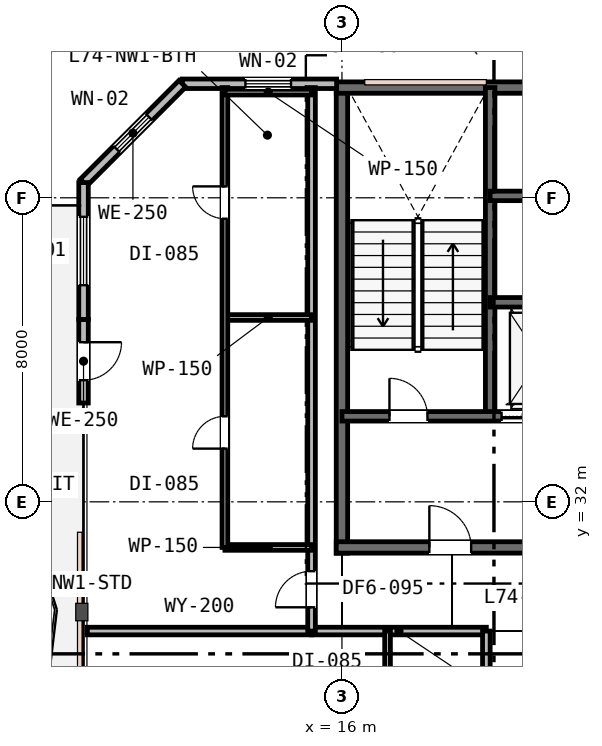
"""IFC4 building model, lengths in metres.
Left out: names, types, materials, properties, quantities, classifications, styles, units other than length and angle.
Written with IfcOpenShell. Run it as: python <this file> out.ifc"""

import sys

from ifc_helpers import new_model, si_unit, direction, frame, frame_2d, origin, place, context, subcontext, project, spatial, rectangle, extrude, element, fill, save


model = new_model("IFC4")
c1 = context("Model", 3, precision=1e-05, world=origin(), true_north=direction((0.0, 1.0)))
c2 = subcontext(c1, "Body", "Model", "MODEL_VIEW")
j1 = project(units=[si_unit("LENGTHUNIT", "METRE"), si_unit("PLANEANGLEUNIT", "RADIAN")], contexts=[c1])
p1 = place(None, origin())
s1 = spatial("IfcSite", under=j1, at=p1, CompositionType="ELEMENT")
p2 = place(p1, origin())
s2 = spatial("IfcBuilding", under=s1, at=p2, CompositionType="ELEMENT")
p3 = place(p2, frame((0.0, 0.0, 286.8)))
s3 = spatial("IfcBuildingStorey", under=s2, at=p3, CompositionType="ELEMENT", Elevation=286.8)
p4 = place(p3, frame((16.0, 30.65, 0.0), z_axis=(0.0, 0.0, 1.0), x_axis=(0.0, 1.0, 0.0)))
e1 = element("IfcWall", 1, at=p4, inside=s3, PredefinedType="SHEAR", context=c2, shape_type="SweptSolid", body=[
    extrude(rectangle(XDim=12.3, YDim=0.3, at=frame_2d((6.15, 0.0))), origin(), (0.0, 0.0, 1.0), 3.8),
])
p5 = place(p3, frame((15.85, 42.9, 0.0), z_axis=(0.0, 0.0, 1.0), x_axis=(1.0, 0.0, 0.0)))
e2 = element("IfcWall", 2, at=p5, inside=s3, PredefinedType="SHEAR", context=c2, shape_type="SweptSolid", body=[
    extrude(rectangle(XDim=24.3, YDim=0.3, at=frame_2d((12.15, 0.0))), origin(), (0.0, 0.0, 1.0), 3.8),
])
p6 = place(p3, frame((15.85, 30.8, 0.0), z_axis=(0.0, 0.0, 1.0), x_axis=(1.0, 0.0, 0.0)))
e3 = element("IfcWall", 3, at=p6, inside=s3, PredefinedType="SHEAR", context=c2, shape_type="SweptSolid", body=[
    extrude(rectangle(XDim=11.2, YDim=0.3, at=frame_2d((5.6, 0.0))), origin(), (0.0, 0.0, 1.0), 3.8),
])
p7 = place(p6, frame((2.45, 0.0, 0.0)))
e4 = element("IfcOpeningElement", 4, at=p7, cuts=e3, PredefinedType="OPENING", context=c2, shape_type="SweptSolid", body=[
    extrude(rectangle(XDim=1.1, YDim=2.15, at=frame_2d((0.55, 1.075))), frame((0.0, 0.16, 0.0), z_axis=(0.0, -1.0, 0.0), x_axis=(1.0, 0.0, 0.0)), (0.0, 0.0, 1.0), 0.32),
])
p8 = place(p3, frame((19.9, 34.25, 0.0), z_axis=(0.0, 0.0, 1.0), x_axis=(0.0, 1.0, 0.0)))
e5 = element("IfcWall", 5, at=p8, inside=s3, PredefinedType="SHEAR", context=c2, shape_type="SweptSolid", body=[
    extrude(rectangle(XDim=8.65, YDim=0.25, at=frame_2d((4.325, 0.0))), origin(), (0.0, 0.0, 1.0), 3.8),
])
p9 = place(p3, frame((16.0, 34.25, 0.0), z_axis=(0.0, 0.0, 1.0), x_axis=(1.0, 0.0, 0.0)))
e6 = element("IfcWall", 6, at=p9, inside=s3, PredefinedType="SHEAR", context=c2, shape_type="SweptSolid", body=[
    extrude(rectangle(XDim=6.05, YDim=0.25, at=frame_2d((3.025, 0.0))), origin(), (0.0, 0.0, 1.0), 3.8),
])
p10 = place(p9, frame((1.25, 0.0, 0.0)))
e7 = element("IfcOpeningElement", 7, at=p10, cuts=e6, PredefinedType="OPENING", context=c2, shape_type="SweptSolid", body=[
    extrude(rectangle(XDim=1.0, YDim=2.15, at=frame_2d((0.5, 1.075))), frame((0.0, 0.135, 0.0), z_axis=(0.0, -1.0, 0.0), x_axis=(1.0, 0.0, 0.0)), (0.0, 0.0, 1.0), 0.27),
])
p11 = place(p9, frame((4.2, 0.0, 0.0)))
e8 = element("IfcOpeningElement", 8, at=p11, cuts=e6, PredefinedType="OPENING", context=c2, shape_type="SweptSolid", body=[
    extrude(rectangle(XDim=1.1, YDim=2.15, at=frame_2d((0.55, 1.075))), frame((0.0, 0.135, 0.0), z_axis=(0.0, -1.0, 0.0), x_axis=(1.0, 0.0, 0.0)), (0.0, 0.0, 1.0), 0.27),
])
p12 = place(p3, frame((19.9, 37.25, 0.0), z_axis=(0.0, 0.0, 1.0), x_axis=(1.0, 0.0, 0.0)))
e9 = element("IfcWall", 9, at=p12, inside=s3, PredefinedType="SHEAR", context=c2, shape_type="SweptSolid", body=[
    extrude(rectangle(XDim=16.2, YDim=0.25, at=frame_2d((8.1, 0.0))), origin(), (0.0, 0.0, 1.0), 3.8),
])
p13 = place(p12, frame((12.55, 0.0, 0.0)))
e10 = element("IfcOpeningElement", 10, at=p13, cuts=e9, PredefinedType="OPENING", context=c2, shape_type="SweptSolid", body=[
    extrude(rectangle(XDim=0.9, YDim=2.15, at=frame_2d((0.45, 1.075))), frame((0.0, 0.135, 0.0), z_axis=(0.0, -1.0, 0.0), x_axis=(1.0, 0.0, 0.0)), (0.0, 0.0, 1.0), 0.27),
])
p14 = place(p12, frame((2.5, 0.0, 0.0)))
e11 = element("IfcOpeningElement", 11, at=p14, cuts=e9, PredefinedType="OPENING", context=c2, shape_type="SweptSolid", body=[
    extrude(rectangle(XDim=1.05, YDim=2.15, at=frame_2d((0.525, 1.075))), frame((0.0, 0.135, 0.0), z_axis=(0.0, -1.0, 0.0), x_axis=(1.0, 0.0, 0.0)), (0.0, 0.0, 1.0), 0.27),
])
p15 = place(p12, frame((4.4, 0.0, 0.0)))
e12 = element("IfcOpeningElement", 12, at=p15, cuts=e9, PredefinedType="OPENING", context=c2, shape_type="SweptSolid", body=[
    extrude(rectangle(XDim=1.05, YDim=2.15, at=frame_2d((0.525, 1.075))), frame((0.0, 0.135, 0.0), z_axis=(0.0, -1.0, 0.0), x_axis=(1.0, 0.0, 0.0)), (0.0, 0.0, 1.0), 0.27),
])
p16 = place(p12, frame((6.3, 0.0, 0.0)))
e13 = element("IfcOpeningElement", 13, at=p16, cuts=e9, PredefinedType="OPENING", context=c2, shape_type="SweptSolid", body=[
    extrude(rectangle(XDim=1.05, YDim=2.15, at=frame_2d((0.525, 1.075))), frame((0.0, 0.135, 0.0), z_axis=(0.0, -1.0, 0.0), x_axis=(1.0, 0.0, 0.0)), (0.0, 0.0, 1.0), 0.27),
])
p17 = place(p3, frame((19.9, 40.05, 0.0), z_axis=(0.0, 0.0, 1.0), x_axis=(1.0, 0.0, 0.0)))
e14 = element("IfcWall", 14, at=p17, inside=s3, PredefinedType="SHEAR", context=c2, shape_type="SweptSolid", body=[
    extrude(rectangle(XDim=12.05, YDim=0.25, at=frame_2d((6.025, 0.0))), origin(), (0.0, 0.0, 1.0), 3.8),
])
p18 = place(p3, frame((15.86, 43.0, 0.0), z_axis=(0.0, 0.0, 1.0), x_axis=(-1.0, 0.0, 0.0)))
e15 = element("IfcWall", 15, at=p18, inside=s3, PredefinedType="STANDARD", context=c2, shape_type="SweptSolid", body=[
    extrude(rectangle(XDim=4.06, YDim=0.25, at=frame_2d((2.03, 0.0))), origin(), (0.0, 0.0, 1.0), 3.47),
])
p19 = place(p18, frame((1.2, 0.0, 0.85)))
e16 = element("IfcOpeningElement", 16, at=p19, cuts=e15, PredefinedType="OPENING", context=c2, shape_type="SweptSolid", body=[
    extrude(rectangle(XDim=1.2, YDim=1.6, at=frame_2d((0.6, 0.8))), frame((0.0, 0.135, 0.0), z_axis=(0.0, -1.0, 0.0), x_axis=(1.0, 0.0, 0.0)), (0.0, 0.0, 1.0), 0.27),
])
p20 = place(p3, frame((11.8, 43.0, 0.0), z_axis=(0.0, 0.0, 1.0), x_axis=(-0.707106781187, -0.707106781187, 0.0)))
e17 = element("IfcWall", 17, at=p20, inside=s3, PredefinedType="STANDARD", context=c2, shape_type="SweptSolid", body=[
    extrude(rectangle(XDim=3.677, YDim=0.25, at=frame_2d((1.839, 0.0))), origin(), (0.0, 0.0, 1.0), 3.47),
])
p21 = place(p20, frame((1.238, 0.0, 0.85)))
e18 = element("IfcOpeningElement", 18, at=p21, cuts=e17, PredefinedType="OPENING", context=c2, shape_type="SweptSolid", body=[
    extrude(rectangle(XDim=1.2, YDim=1.6, at=frame_2d((0.6, 0.8))), frame((0.0, 0.135, 0.0), z_axis=(0.0, -1.0, 0.0), x_axis=(1.0, 0.0, 0.0)), (0.0, 0.0, 1.0), 0.27),
])
p22 = place(p3, frame((9.2, 36.8, 0.0), z_axis=(0.0, 0.0, 1.0), x_axis=(0.0, -1.0, 0.0)))
e19 = element("IfcWall", 19, at=p22, inside=s3, PredefinedType="STANDARD", context=c2, shape_type="SweptSolid", body=[
    extrude(rectangle(XDim=2.2, YDim=0.25, at=frame_2d((1.1, 0.0))), origin(), (0.0, 0.0, 1.0), 3.47),
])
p23 = place(p22, frame((0.6, 0.0, 0.0)))
e20 = element("IfcOpeningElement", 20, at=p23, cuts=e19, PredefinedType="OPENING", context=c2, shape_type="SweptSolid", body=[
    extrude(rectangle(XDim=1.0, YDim=2.15, at=frame_2d((0.5, 1.075))), frame((0.0, 0.135, 0.0), z_axis=(0.0, -1.0, 0.0), x_axis=(1.0, 0.0, 0.0)), (0.0, 0.0, 1.0), 0.27),
])
p24 = place(p3, frame((9.2, 40.4, 0.0), z_axis=(0.0, 0.0, 1.0), x_axis=(0.0, -1.0, 0.0)))
e21 = element("IfcWall", 21, at=p24, inside=s3, PredefinedType="STANDARD", context=c2, shape_type="SweptSolid", body=[
    extrude(rectangle(XDim=3.6, YDim=0.25, at=frame_2d((1.8, 0.0))), origin(), (0.0, 0.0, 1.0), 3.47),
])
p25 = place(p24, frame((0.9, 0.0, 0.75)))
e22 = element("IfcOpeningElement", 22, at=p25, cuts=e21, PredefinedType="OPENING", context=c2, shape_type="SweptSolid", body=[
    extrude(rectangle(XDim=1.8, YDim=1.85, at=frame_2d((0.9, 0.925))), frame((0.0, 0.135, 0.0), z_axis=(0.0, -1.0, 0.0), x_axis=(1.0, 0.0, 0.0)), (0.0, 0.0, 1.0), 0.27),
])
p26 = place(p3, frame((9.3, 28.6, 0.0), z_axis=(0.0, 0.0, 1.0), x_axis=(1.0, 0.0, 0.0)))
e23 = element("IfcWall", 23, at=p26, inside=s3, PredefinedType="PARTITIONING", context=c2, shape_type="SweptSolid", body=[
    extrude(rectangle(XDim=5.9, YDim=0.2, at=frame_2d((2.95, 0.0))), origin(), (0.0, 0.0, 1.0), 3.47),
])
p27 = place(p3, frame((15.2, 28.6, 0.0), z_axis=(0.0, 0.0, 1.0), x_axis=(1.0, 0.0, 0.0)))
e24 = element("IfcWall", 24, at=p27, inside=s3, PredefinedType="PARTITIONING", context=c2, shape_type="SweptSolid", body=[
    extrude(rectangle(XDim=4.6, YDim=0.2, at=frame_2d((2.3, 0.0))), origin(), (0.0, 0.0, 1.0), 3.18),
])
p28 = place(p3, frame((15.2, 28.6, 0.0), z_axis=(0.0, 0.0, 1.0), x_axis=(0.0, 1.0, 0.0)))
e25 = element("IfcWall", 25, at=p28, inside=s3, PredefinedType="PARTITIONING", context=c2, shape_type="SweptSolid", body=[
    extrude(rectangle(XDim=14.3, YDim=0.2, at=frame_2d((7.15, 0.0))), origin(), (0.0, 0.0, 1.0), 3.47),
])
p29 = place(p28, frame((0.625, 0.0, 0.0)))
e26 = element("IfcOpeningElement", 26, at=p29, cuts=e25, PredefinedType="OPENING", context=c2, shape_type="SweptSolid", body=[
    extrude(rectangle(XDim=0.95, YDim=2.15, at=frame_2d((0.475, 1.075))), frame((0.0, 0.11, 0.0), z_axis=(0.0, -1.0, 0.0), x_axis=(1.0, 0.0, 0.0)), (0.0, 0.0, 1.0), 0.22),
])
for number, where, z_axis, x_axis in (
    (27, (12.92, 30.8, 0.0), (0.0, 0.0, 1.0), (1.0, 0.0, 0.0)),
    (28, (12.92, 36.85, 0.0), (0.0, 0.0, 1.0), (1.0, 0.0, 0.0)),
):
    element("IfcWall", number, at=place(p3, frame(where, z_axis=z_axis, x_axis=x_axis)), inside=s3, PredefinedType="PARTITIONING", context=c2, shape_type="SweptSolid", body=[
        extrude(rectangle(XDim=2.28, YDim=0.15, at=frame_2d((1.14, 0.0))), origin(), (0.0, 0.0, 1.0), 3.47),
    ])
p30 = place(p3, frame((12.92, 30.8, 0.0), z_axis=(0.0, 0.0, 1.0), x_axis=(0.0, 1.0, 0.0)))
e29 = element("IfcWall", 29, at=p30, inside=s3, PredefinedType="PARTITIONING", context=c2, shape_type="SweptSolid", body=[
    extrude(rectangle(XDim=12.1, YDim=0.15, at=frame_2d((6.05, 0.0))), origin(), (0.0, 0.0, 1.0), 3.47),
])
p31 = place(p30, frame((2.6, 0.0, 0.0)))
e30 = element("IfcOpeningElement", 30, at=p31, cuts=e29, PredefinedType="OPENING", context=c2, shape_type="SweptSolid", body=[
    extrude(rectangle(XDim=0.85, YDim=2.15, at=frame_2d((0.425, 1.075))), frame((0.0, 0.085, 0.0), z_axis=(0.0, -1.0, 0.0), x_axis=(1.0, 0.0, 0.0)), (0.0, 0.0, 1.0), 0.17),
])
p32 = place(p30, frame((8.65, 0.0, 0.0)))
e31 = element("IfcOpeningElement", 31, at=p32, cuts=e29, PredefinedType="OPENING", context=c2, shape_type="SweptSolid", body=[
    extrude(rectangle(XDim=0.85, YDim=2.15, at=frame_2d((0.425, 1.075))), frame((0.0, 0.085, 0.0), z_axis=(0.0, -1.0, 0.0), x_axis=(1.0, 0.0, 0.0)), (0.0, 0.0, 1.0), 0.17),
])
p33 = place(p3, frame((12.92, 42.78, 0.0), z_axis=(0.0, 0.0, 1.0), x_axis=(1.0, 0.0, 0.0)))
e32 = element("IfcWall", 32, at=p33, inside=s3, PredefinedType="PARTITIONING", context=c2, shape_type="SweptSolid", body=[
    extrude(rectangle(XDim=2.28, YDim=0.15, at=frame_2d((1.14, 0.0))), origin(), (0.0, 0.0, 1.0), 3.47),
])
p34 = place(p3, frame((19.8, 17.0, 0.0), z_axis=(0.0, 0.0, 1.0), x_axis=(0.0, 1.0, 0.0)))
e33 = element("IfcWall", 33, at=p34, inside=s3, PredefinedType="PARTITIONING", context=c2, shape_type="SweptSolid", body=[
    extrude(rectangle(XDim=11.6, YDim=0.2, at=frame_2d((5.8, 0.0))), origin(), (0.0, 0.0, 1.0), 3.18),
])
p35 = place(p34, frame((0.723, 0.0, 0.0)))
e34 = element("IfcOpeningElement", 34, at=p35, cuts=e33, PredefinedType="OPENING", context=c2, shape_type="SweptSolid", body=[
    extrude(rectangle(XDim=0.95, YDim=2.15, at=frame_2d((0.475, 1.075))), frame((0.0, 0.11, 0.0), z_axis=(0.0, -1.0, 0.0), x_axis=(1.0, 0.0, 0.0)), (0.0, 0.0, 1.0), 0.22),
])
p36 = place(p3, frame((17.2, 19.396, 0.0), z_axis=(0.0, 0.0, 1.0), x_axis=(0.0, 1.0, 0.0)))
e35 = element("IfcWall", 35, at=p36, inside=s3, PredefinedType="PARTITIONING", context=c2, shape_type="SweptSolid", body=[
    extrude(rectangle(XDim=9.204, YDim=0.15, at=frame_2d((4.602, 0.0))), origin(), (0.0, 0.0, 1.0), 3.18),
])
p37 = place(p36, frame((0.6, 0.0, 0.0)))
e36 = element("IfcOpeningElement", 36, at=p37, cuts=e35, PredefinedType="OPENING", context=c2, shape_type="SweptSolid", body=[
    extrude(rectangle(XDim=0.85, YDim=2.15, at=frame_2d((0.425, 1.075))), frame((0.0, 0.085, 0.0), z_axis=(0.0, -1.0, 0.0), x_axis=(1.0, 0.0, 0.0)), (0.0, 0.0, 1.0), 0.17),
])
p38 = place(p36, frame((2.65, 0.0, 0.0)))
e37 = element("IfcOpeningElement", 37, at=p38, cuts=e35, PredefinedType="OPENING", context=c2, shape_type="SweptSolid", body=[
    extrude(rectangle(XDim=0.85, YDim=2.15, at=frame_2d((0.425, 1.075))), frame((0.0, 0.085, 0.0), z_axis=(0.0, -1.0, 0.0), x_axis=(1.0, 0.0, 0.0)), (0.0, 0.0, 1.0), 0.17),
])
p39 = place(p36, frame((6.593, 0.0, 0.0)))
e38 = element("IfcOpeningElement", 38, at=p39, cuts=e35, PredefinedType="OPENING", context=c2, shape_type="SweptSolid", body=[
    extrude(rectangle(XDim=0.85, YDim=2.15, at=frame_2d((0.425, 1.075))), frame((0.0, 0.085, 0.0), z_axis=(0.0, -1.0, 0.0), x_axis=(1.0, 0.0, 0.0)), (0.0, 0.0, 1.0), 0.17),
])
p40 = place(p19, origin())
e39 = element("IfcWindow", 39, at=p40, inside=s3, PartitioningType="SINGLE_PANEL", PredefinedType="WINDOW", context=c2, shape_type="SweptSolid", body=[
    extrude(rectangle(XDim=1.2, YDim=1.6, at=frame_2d((0.6, 0.8))), frame((0.0, 0.03, 0.0), z_axis=(0.0, -1.0, 0.0), x_axis=(1.0, 0.0, 0.0)), (0.0, 0.0, 1.0), 0.06),
])
fill(e16, e39)
p41 = place(p21, origin())
e40 = element("IfcWindow", 40, at=p41, inside=s3, PartitioningType="SINGLE_PANEL", PredefinedType="WINDOW", context=c2, shape_type="SweptSolid", body=[
    extrude(rectangle(XDim=1.2, YDim=1.6, at=frame_2d((0.6, 0.8))), frame((0.0, 0.03, 0.0), z_axis=(0.0, -1.0, 0.0), x_axis=(1.0, 0.0, 0.0)), (0.0, 0.0, 1.0), 0.06),
])
fill(e18, e40)
p42 = place(p23, origin())
e41 = element("IfcDoor", 41, at=p42, inside=s3, OperationType="SINGLE_SWING_LEFT", PredefinedType="DOOR", context=c2, shape_type="SweptSolid", body=[
    extrude(rectangle(XDim=1.0, YDim=2.15, at=frame_2d((0.5, 1.075))), frame((0.0, 0.025, 0.0), z_axis=(0.0, -1.0, 0.0), x_axis=(1.0, 0.0, 0.0)), (0.0, 0.0, 1.0), 0.05),
])
fill(e20, e41)
p43 = place(p25, origin())
e42 = element("IfcWindow", 42, at=p43, inside=s3, PartitioningType="SINGLE_PANEL", PredefinedType="WINDOW", context=c2, shape_type="SweptSolid", body=[
    extrude(rectangle(XDim=1.8, YDim=1.85, at=frame_2d((0.9, 0.925))), frame((0.0, 0.03, 0.0), z_axis=(0.0, -1.0, 0.0), x_axis=(1.0, 0.0, 0.0)), (0.0, 0.0, 1.0), 0.06),
])
fill(e22, e42)
p44 = place(p10, origin())
e43 = element("IfcDoor", 43, at=p44, inside=s3, OperationType="SINGLE_SWING_LEFT", PredefinedType="DOOR", context=c2, shape_type="SweptSolid", body=[
    extrude(rectangle(XDim=1.0, YDim=2.15, at=frame_2d((0.5, 1.075))), frame((0.0, 0.025, 0.0), z_axis=(0.0, -1.0, 0.0), x_axis=(1.0, 0.0, 0.0)), (0.0, 0.0, 1.0), 0.05),
])
fill(e7, e43)
p45 = place(p7, origin())
e44 = element("IfcDoor", 44, at=p45, inside=s3, OperationType="SINGLE_SWING_LEFT", PredefinedType="DOOR", context=c2, shape_type="SweptSolid", body=[
    extrude(rectangle(XDim=1.1, YDim=2.15, at=frame_2d((0.55, 1.075))), frame((0.0, 0.025, 0.0), z_axis=(0.0, -1.0, 0.0), x_axis=(1.0, 0.0, 0.0)), (0.0, 0.0, 1.0), 0.05),
])
fill(e4, e44)
p46 = place(p29, origin())
e45 = element("IfcDoor", 45, at=p46, inside=s3, OperationType="SINGLE_SWING_LEFT", PredefinedType="DOOR", context=c2, shape_type="SweptSolid", body=[
    extrude(rectangle(XDim=0.95, YDim=2.15, at=frame_2d((0.475, 1.075))), frame((0.0, 0.025, 0.0), z_axis=(0.0, -1.0, 0.0), x_axis=(1.0, 0.0, 0.0)), (0.0, 0.0, 1.0), 0.05),
])
fill(e26, e45)
p47 = place(p31, origin())
e46 = element("IfcDoor", 46, at=p47, inside=s3, OperationType="SINGLE_SWING_LEFT", PredefinedType="DOOR", context=c2, shape_type="SweptSolid", body=[
    extrude(rectangle(XDim=0.85, YDim=2.15, at=frame_2d((0.425, 1.075))), frame((0.0, 0.025, 0.0), z_axis=(0.0, -1.0, 0.0), x_axis=(1.0, 0.0, 0.0)), (0.0, 0.0, 1.0), 0.05),
])
fill(e30, e46)
p48 = place(p32, origin())
e47 = element("IfcDoor", 47, at=p48, inside=s3, OperationType="SINGLE_SWING_RIGHT", PredefinedType="DOOR", context=c2, shape_type="SweptSolid", body=[
    extrude(rectangle(XDim=0.85, YDim=2.15, at=frame_2d((0.425, 1.075))), frame((0.0, 0.025, 0.0), z_axis=(0.0, -1.0, 0.0), x_axis=(1.0, 0.0, 0.0)), (0.0, 0.0, 1.0), 0.05),
])
fill(e31, e47)
p49 = place(p11, origin())
e48 = element("IfcDoor", 48, at=p49, inside=s3, OperationType="DOUBLE_DOOR_SLIDING", PredefinedType="DOOR", context=c2, shape_type="SweptSolid", body=[
    extrude(rectangle(XDim=1.1, YDim=2.15, at=frame_2d((0.55, 1.075))), frame((0.0, 0.025, 0.0), z_axis=(0.0, -1.0, 0.0), x_axis=(1.0, 0.0, 0.0)), (0.0, 0.0, 1.0), 0.05),
])
fill(e8, e48)
save(model, sys.argv[1])
